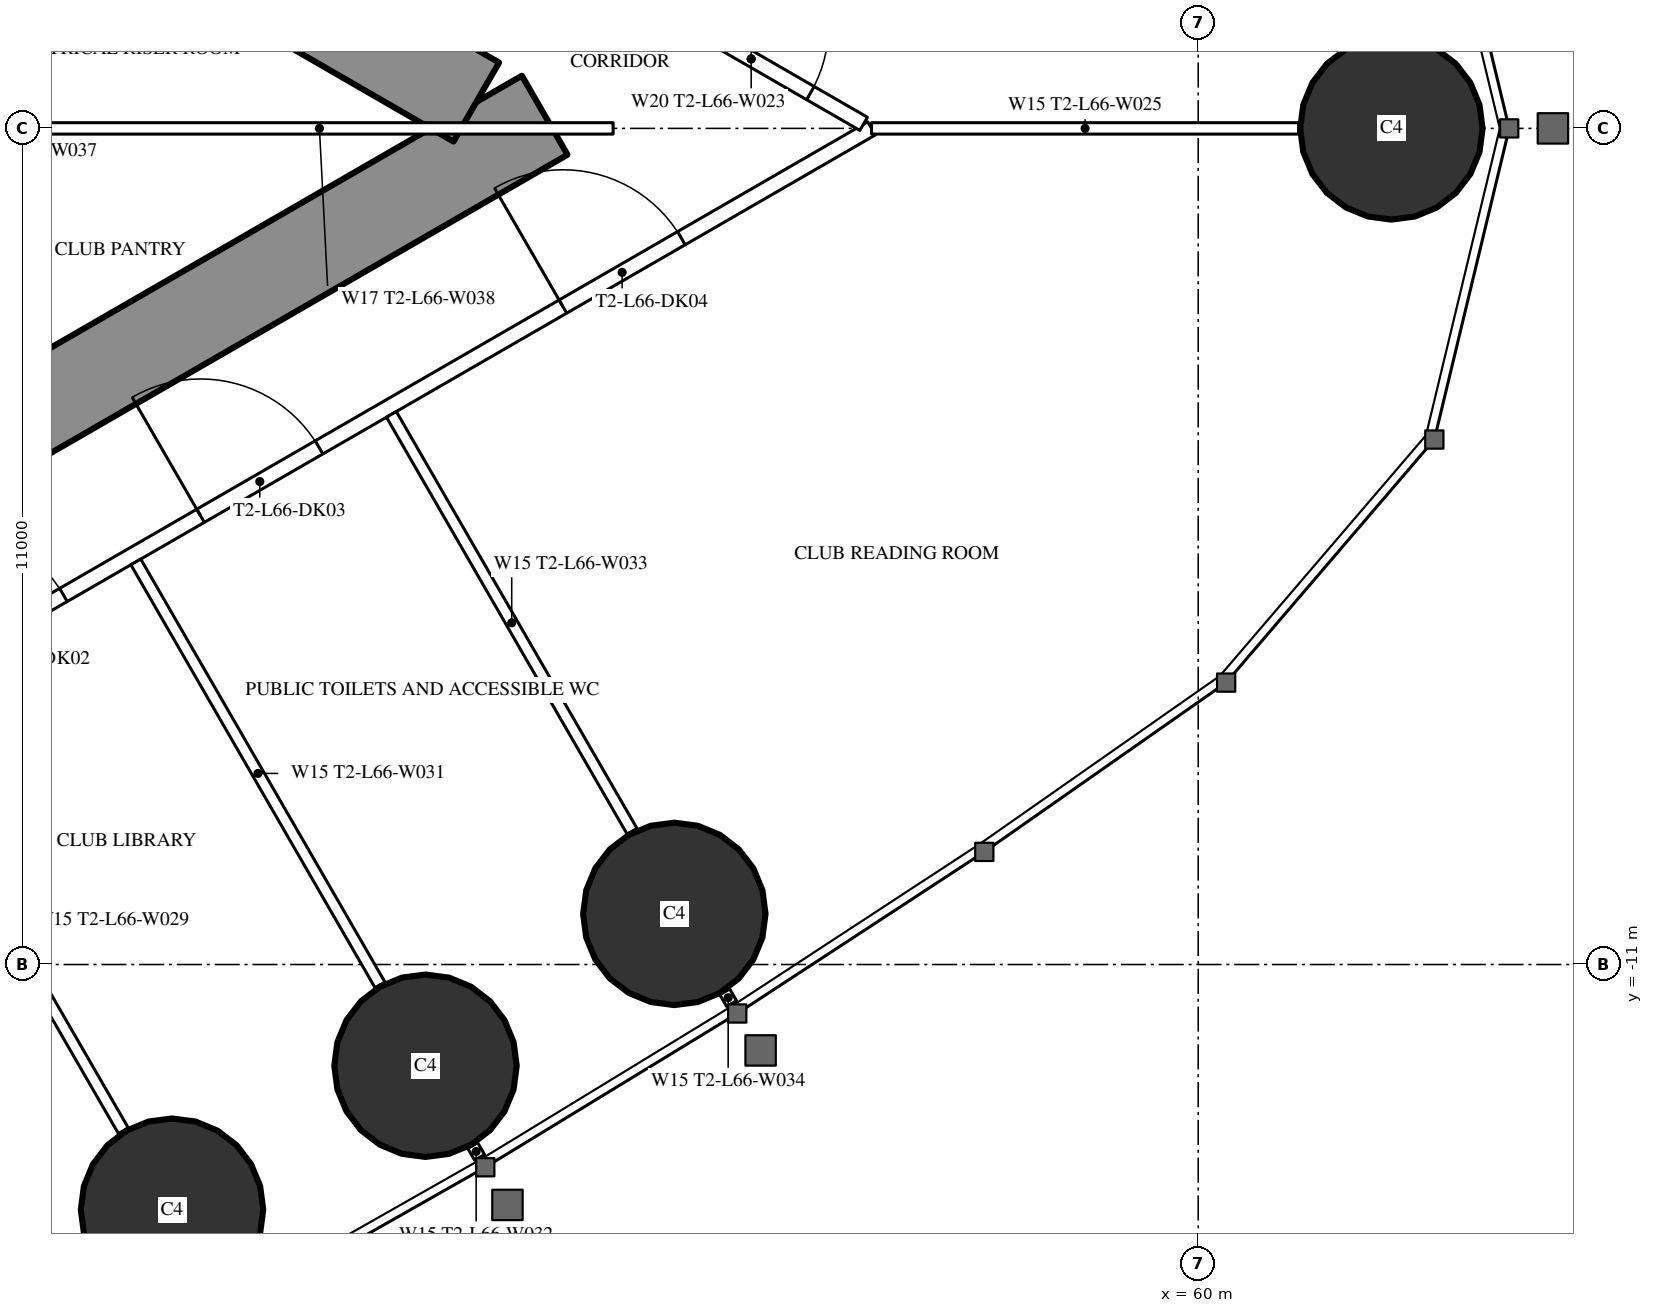
"""IFC4 building model, lengths in metres.
Left out: names, types, materials, properties, quantities, classifications, styles, units other than length and angle.
Written with IfcOpenShell. Run it as: python <this file> out.ifc"""

import sys

from ifc_helpers import new_model, si_unit, direction, frame, frame_2d, origin, origin_2d, place, context, subcontext, project, spatial, rectangle, circle, extrude, element, fill, save


model = new_model("IFC4")
c1 = context("Model", 3, precision=1e-05, world=origin(), true_north=direction((0.0, 1.0)))
c2 = subcontext(c1, "Body", "Model", "MODEL_VIEW")
j1 = project(units=[si_unit("LENGTHUNIT", "METRE"), si_unit("PLANEANGLEUNIT", "RADIAN")], contexts=[c1])
p1 = place(None, origin())
s1 = spatial("IfcSite", under=j1, at=p1, CompositionType="ELEMENT")
p2 = place(p1, origin())
s2 = spatial("IfcBuilding", under=s1, at=p2, CompositionType="ELEMENT")
p3 = place(p2, frame((0.0, 0.0, 247.7)))
s3 = spatial("IfcBuildingStorey", under=s2, at=p3, CompositionType="ELEMENT", Elevation=247.7)
for number, where, z_axis, x_axis in (
    (1, (62.542, 0.0, 0.0), (0.0, 0.0, 1.0), (1.0, 0.0, 0.0)),
    (2, (46.499, -14.226, 0.0), (0.0, 0.0, 1.0), (1.0, 0.0, 0.0)),
    (3, (49.834, -12.332, 0.0), (0.0, 0.0, 1.0), (1.0, 0.0, 0.0)),
    (4, (53.108, -10.334, 0.0), (0.0, 0.0, 1.0), (1.0, 0.0, 0.0)),
):
    element("IfcColumn", number, at=place(p3, frame(where, z_axis=z_axis, x_axis=x_axis)), inside=s3, PredefinedType="COLUMN", context=c2, shape_type="SweptSolid", body=[
        extrude(circle(Radius=1.2, at=origin_2d()), origin(), (0.0, 0.0, 1.0), 4.2),
    ])
p4 = place(p3, frame((27.2, -13.8, 0.0), z_axis=(0.0, 0.0, 1.0), x_axis=(0.866027159892, 0.499996958321, 0.0)))
e5 = element("IfcWall", 5, at=p4, inside=s3, PredefinedType="SHEAR", context=c2, shape_type="SweptSolid", body=[
    extrude(rectangle(XDim=27.947, YDim=1.2, at=frame_2d((13.973, 0.0))), origin(), (0.0, 0.0, 1.0), 4.2),
])
p5 = place(p4, frame((4.6, 0.0, 0.0)))
e6 = element("IfcOpeningElement", 6, at=p5, cuts=e5, PredefinedType="OPENING", context=c2, shape_type="SweptSolid", body=[
    extrude(rectangle(XDim=1.0, YDim=2.2, at=frame_2d((0.5, 1.1))), frame((0.0, 0.61, 0.0), z_axis=(0.0, -1.0, 0.0), x_axis=(1.0, 0.0, 0.0)), (0.0, 0.0, 1.0), 1.22),
])
p6 = place(p4, frame((13.395, 0.0, 0.0)))
e7 = element("IfcOpeningElement", 7, at=p6, cuts=e5, PredefinedType="OPENING", context=c2, shape_type="SweptSolid", body=[
    extrude(rectangle(XDim=1.8, YDim=2.2, at=frame_2d((0.9, 1.1))), frame((0.0, 0.61, 0.0), z_axis=(0.0, -1.0, 0.0), x_axis=(1.0, 0.0, 0.0)), (0.0, 0.0, 1.0), 1.22),
])
p7 = place(p3, frame((27.2, 13.8, 0.0), z_axis=(0.0, 0.0, 1.0), x_axis=(0.866024515034, -0.500001539357, 0.0)))
e8 = element("IfcWall", 8, at=p7, inside=s3, PredefinedType="SHEAR", context=c2, shape_type="SweptSolid", body=[
    extrude(rectangle(XDim=26.907, YDim=1.2, at=frame_2d((13.454, 0.0))), origin(), (0.0, 0.0, 1.0), 4.2),
])
p8 = place(p7, frame((4.6, 0.0, 0.0)))
e9 = element("IfcOpeningElement", 9, at=p8, cuts=e8, PredefinedType="OPENING", context=c2, shape_type="SweptSolid", body=[
    extrude(rectangle(XDim=1.0, YDim=2.2, at=frame_2d((0.5, 1.1))), frame((0.0, 0.61, 0.0), z_axis=(0.0, -1.0, 0.0), x_axis=(1.0, 0.0, 0.0)), (0.0, 0.0, 1.0), 1.22),
])
p9 = place(p7, frame((13.395, 0.0, 0.0)))
e10 = element("IfcOpeningElement", 10, at=p9, cuts=e8, PredefinedType="OPENING", context=c2, shape_type="SweptSolid", body=[
    extrude(rectangle(XDim=1.8, YDim=2.2, at=frame_2d((0.9, 1.1))), frame((0.0, 0.61, 0.0), z_axis=(0.0, -1.0, 0.0), x_axis=(1.0, 0.0, 0.0)), (0.0, 0.0, 1.0), 1.22),
])
p10 = place(p3, frame((28.907, -15.47, 0.0), z_axis=(0.0, 0.0, 1.0), x_axis=(0.866023700353, 0.500002950419, 0.0)))
e11 = element("IfcWall", 11, at=p10, inside=s3, PredefinedType="PARTITIONING", context=c2, shape_type="SweptSolid", body=[
    extrude(rectangle(XDim=30.941, YDim=0.2, at=frame_2d((15.47, 0.0))), origin(), (0.0, 0.0, 1.0), 3.95),
])
p11 = place(p10, frame((7.124, 0.0, 0.0)))
e12 = element("IfcOpeningElement", 12, at=p11, cuts=e11, PredefinedType="OPENING", context=c2, shape_type="SweptSolid", body=[
    extrude(rectangle(XDim=1.8, YDim=2.2, at=frame_2d((0.9, 1.1))), frame((0.0, 0.11, 0.0), z_axis=(0.0, -1.0, 0.0), x_axis=(1.0, 0.0, 0.0)), (0.0, 0.0, 1.0), 0.22),
])
p12 = place(p10, frame((16.865, 0.0, 0.0)))
e13 = element("IfcOpeningElement", 13, at=p12, cuts=e11, PredefinedType="OPENING", context=c2, shape_type="SweptSolid", body=[
    extrude(rectangle(XDim=1.8, YDim=2.2, at=frame_2d((0.9, 1.1))), frame((0.0, 0.11, 0.0), z_axis=(0.0, -1.0, 0.0), x_axis=(1.0, 0.0, 0.0)), (0.0, 0.0, 1.0), 0.22),
])
p13 = place(p10, frame((20.748, 0.0, 0.0)))
e14 = element("IfcOpeningElement", 14, at=p13, cuts=e11, PredefinedType="OPENING", context=c2, shape_type="SweptSolid", body=[
    extrude(rectangle(XDim=1.8, YDim=2.2, at=frame_2d((0.9, 1.1))), frame((0.0, 0.11, 0.0), z_axis=(0.0, -1.0, 0.0), x_axis=(1.0, 0.0, 0.0)), (0.0, 0.0, 1.0), 0.22),
])
p14 = place(p10, frame((26.252, 0.0, 0.0)))
e15 = element("IfcOpeningElement", 15, at=p14, cuts=e11, PredefinedType="OPENING", context=c2, shape_type="SweptSolid", body=[
    extrude(rectangle(XDim=1.8, YDim=2.2, at=frame_2d((0.9, 1.1))), frame((0.0, 0.11, 0.0), z_axis=(0.0, -1.0, 0.0), x_axis=(1.0, 0.0, 0.0)), (0.0, 0.0, 1.0), 0.22),
])
p15 = place(p3, frame((42.66, -7.646, 0.0), z_axis=(0.0, 0.0, 1.0), x_axis=(0.499996592859, -0.866027370889, 0.0)))
e16 = element("IfcWall", 16, at=p15, inside=s3, PredefinedType="PARTITIONING", context=c2, shape_type="SweptSolid", body=[
    extrude(rectangle(XDim=6.398, YDim=0.15, at=frame_2d((3.199, 0.0))), origin(), (0.0, 0.0, 1.0), 3.05),
])
p16 = place(p3, frame((46.023, -5.704, 0.0), z_axis=(0.0, 0.0, 1.0), x_axis=(0.499984478165, -0.866034365135, 0.0)))
e17 = element("IfcWall", 17, at=p16, inside=s3, PredefinedType="PARTITIONING", context=c2, shape_type="SweptSolid", body=[
    extrude(rectangle(XDim=6.426, YDim=0.15, at=frame_2d((3.213, 0.0))), origin(), (0.0, 0.0, 1.0), 3.05),
])
p17 = place(p3, frame((50.456, -13.382, 0.0), z_axis=(0.0, 0.0, 1.0), x_axis=(0.500661834965, -0.865642955848, 0.0)))
e18 = element("IfcWall", 18, at=p17, inside=s3, PredefinedType="PARTITIONING", context=c2, shape_type="SweptSolid", body=[
    extrude(rectangle(XDim=0.18, YDim=0.15, at=frame_2d((0.09, 0.0))), origin(), (0.0, 0.0, 1.0), 3.05),
])
p18 = place(p3, frame((49.385, -3.763, 0.0), z_axis=(0.0, 0.0, 1.0), x_axis=(0.499999447814, -0.866025722589, 0.0)))
e19 = element("IfcWall", 19, at=p18, inside=s3, PredefinedType="PARTITIONING", context=c2, shape_type="SweptSolid", body=[
    extrude(rectangle(XDim=6.333, YDim=0.15, at=frame_2d((3.166, 0.0))), origin(), (0.0, 0.0, 1.0), 3.05),
])
p19 = place(p3, frame((53.771, -11.36, 0.0), z_axis=(0.0, 0.0, 1.0), x_axis=(0.499524978789, -0.866299483762, 0.0)))
e20 = element("IfcWall", 20, at=p19, inside=s3, PredefinedType="PARTITIONING", context=c2, shape_type="SweptSolid", body=[
    extrude(rectangle(XDim=0.178, YDim=0.15, at=frame_2d((0.089, 0.0))), origin(), (0.0, 0.0, 1.0), 3.05),
])
p20 = place(p3, frame((55.702, 0.0, 0.0), z_axis=(0.0, 0.0, 1.0), x_axis=(1.0, 0.0, 0.0)))
e21 = element("IfcWall", 21, at=p20, inside=s3, PredefinedType="PARTITIONING", context=c2, shape_type="SweptSolid", body=[
    extrude(rectangle(XDim=5.619, YDim=0.15, at=frame_2d((2.81, 0.0))), origin(), (0.0, 0.0, 1.0), 3.05),
])
p21 = place(p3, frame((52.639, 1.769, 0.0), z_axis=(0.0, 0.0, 1.0), x_axis=(0.866027340901, -0.4999966448, 0.0)))
e22 = element("IfcWall", 22, at=p21, inside=s3, PredefinedType="PARTITIONING", context=c2, shape_type="SweptSolid", body=[
    extrude(rectangle(XDim=3.417, YDim=0.2, at=frame_2d((1.708, 0.0))), origin(), (0.0, 0.0, 1.0), 3.95),
])
p22 = place(p21, frame((0.809, 0.0, 0.0)))
e23 = element("IfcOpeningElement", 23, at=p22, cuts=e22, PredefinedType="OPENING", context=c2, shape_type="SweptSolid", body=[
    extrude(rectangle(XDim=1.8, YDim=2.2, at=frame_2d((0.9, 1.1))), frame((0.0, 0.11, 0.0), z_axis=(0.0, -1.0, 0.0), x_axis=(1.0, 0.0, 0.0)), (0.0, 0.0, 1.0), 0.22),
])
p23 = place(p3, frame((44.575, 0.0, 0.0), z_axis=(0.0, 0.0, 1.0), x_axis=(1.0, 0.0, 0.0)))
e24 = element("IfcWall", 24, at=p23, inside=s3, PredefinedType="PARTITIONING", context=c2, shape_type="SweptSolid", body=[
    extrude(rectangle(XDim=7.727, YDim=0.15, at=frame_2d((3.864, 0.0))), origin(), (0.0, 0.0, 1.0), 3.05),
])
p24 = place(p12, origin())
e25 = element("IfcDoor", 25, at=p24, inside=s3, OperationType="DOUBLE_DOOR_SINGLE_SWING", PredefinedType="DOOR", context=c2, shape_type="SweptSolid", body=[
    extrude(rectangle(XDim=1.8, YDim=2.2, at=frame_2d((0.9, 1.1))), frame((0.0, 0.025, 0.0), z_axis=(0.0, -1.0, 0.0), x_axis=(1.0, 0.0, 0.0)), (0.0, 0.0, 1.0), 0.05),
])
fill(e13, e25)
p25 = place(p13, origin())
e26 = element("IfcDoor", 26, at=p25, inside=s3, OperationType="DOUBLE_DOOR_SINGLE_SWING", PredefinedType="DOOR", context=c2, shape_type="SweptSolid", body=[
    extrude(rectangle(XDim=1.8, YDim=2.2, at=frame_2d((0.9, 1.1))), frame((0.0, 0.025, 0.0), z_axis=(0.0, -1.0, 0.0), x_axis=(1.0, 0.0, 0.0)), (0.0, 0.0, 1.0), 0.05),
])
fill(e14, e26)
p26 = place(p14, origin())
e27 = element("IfcDoor", 27, at=p26, inside=s3, OperationType="DOUBLE_DOOR_SINGLE_SWING", PredefinedType="DOOR", context=c2, shape_type="SweptSolid", body=[
    extrude(rectangle(XDim=1.8, YDim=2.2, at=frame_2d((0.9, 1.1))), frame((0.0, 0.025, 0.0), z_axis=(0.0, -1.0, 0.0), x_axis=(1.0, 0.0, 0.0)), (0.0, 0.0, 1.0), 0.05),
])
fill(e15, e27)
p27 = place(p22, origin())
e28 = element("IfcDoor", 28, at=p27, inside=s3, OperationType="DOUBLE_DOOR_SINGLE_SWING", PredefinedType="DOOR", context=c2, shape_type="SweptSolid", body=[
    extrude(rectangle(XDim=1.8, YDim=2.2, at=frame_2d((0.9, 1.1))), frame((0.0, 0.025, 0.0), z_axis=(0.0, -1.0, 0.0), x_axis=(1.0, 0.0, 0.0)), (0.0, 0.0, 1.0), 0.05),
])
fill(e23, e28)
save(model, sys.argv[1])
